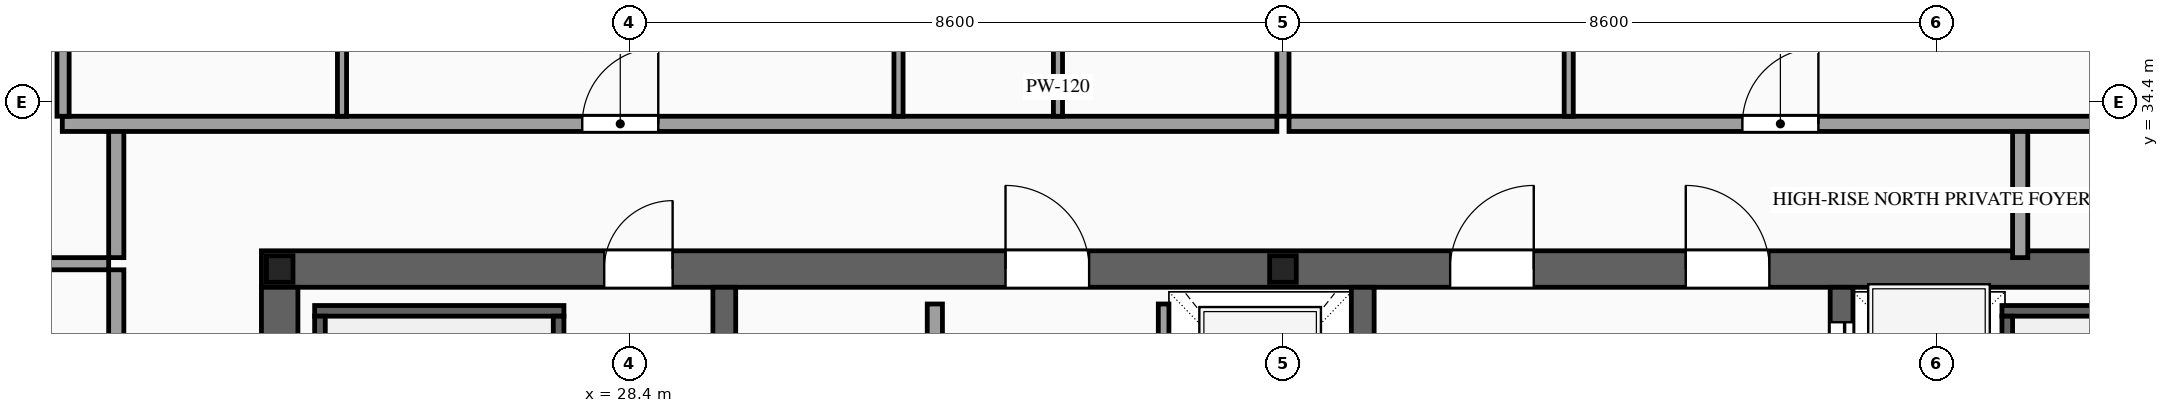
"""IFC4 building model, lengths in metres.
Left out: names, types, materials, properties, quantities, classifications, styles, units other than length and angle.
Written with IfcOpenShell. Run it as: python <this file> out.ifc"""

import sys

from ifc_helpers import new_model, si_unit, direction, frame, frame_2d, origin, origin_2d, place, context, subcontext, project, spatial, rectangle, i_section, extrude, source, transform, mapped, element, fill, save


model = new_model("IFC4")
c1 = context("Model", 3, precision=1e-05, world=origin(), true_north=direction((0.0, 1.0)))
c2 = subcontext(c1, "Body", "Model", "MODEL_VIEW")
j1 = project(units=[si_unit("LENGTHUNIT", "METRE"), si_unit("PLANEANGLEUNIT", "RADIAN")], contexts=[c1])
p1 = place(None, origin())
s1 = spatial("IfcSite", under=j1, at=p1, CompositionType="ELEMENT")
p2 = place(p1, origin())
s2 = spatial("IfcBuilding", under=s1, at=p2, CompositionType="ELEMENT")
p3 = place(p2, frame((0.0, 0.0, 318.2)))
s3 = spatial("IfcBuildingStorey", under=s2, at=p3, CompositionType="ELEMENT", Elevation=318.2)
p4 = place(p3, frame((23.56, 32.2, 0.0), z_axis=(0.0, 0.0, 1.0), x_axis=(1.0, 0.0, 0.0)))
e1 = element("IfcWall", 1, at=p4, inside=s3, PredefinedType="SHEAR", context=c2, shape_type="SweptSolid", body=[
    extrude(rectangle(XDim=26.88, YDim=0.48, at=frame_2d((13.44, 0.0))), origin(), (0.0, 0.0, 1.0), 3.5),
])
p5 = place(p4, frame((4.51, 0.0, 0.0)))
e2 = element("IfcOpeningElement", 2, at=p5, cuts=e1, PredefinedType="OPENING", context=c2, shape_type="SweptSolid", body=[
    extrude(rectangle(XDim=0.9, YDim=2.15, at=frame_2d((0.45, 1.075))), frame((0.0, 0.255, 0.0), z_axis=(0.0, -1.0, 0.0), x_axis=(1.0, 0.0, 0.0)), (0.0, 0.0, 1.0), 0.51),
])
p6 = place(p4, frame((9.79, 0.0, 0.0)))
e3 = element("IfcOpeningElement", 3, at=p6, cuts=e1, PredefinedType="OPENING", context=c2, shape_type="SweptSolid", body=[
    extrude(rectangle(XDim=1.1, YDim=2.2, at=frame_2d((0.55, 1.1))), frame((0.0, 0.255, 0.0), z_axis=(0.0, -1.0, 0.0), x_axis=(1.0, 0.0, 0.0)), (0.0, 0.0, 1.0), 0.51),
])
p7 = place(p4, frame((15.64, 0.0, 0.0)))
e4 = element("IfcOpeningElement", 4, at=p7, cuts=e1, PredefinedType="OPENING", context=c2, shape_type="SweptSolid", body=[
    extrude(rectangle(XDim=1.1, YDim=2.2, at=frame_2d((0.55, 1.1))), frame((0.0, 0.255, 0.0), z_axis=(0.0, -1.0, 0.0), x_axis=(1.0, 0.0, 0.0)), (0.0, 0.0, 1.0), 0.51),
])
p8 = place(p4, frame((18.74, 0.0, 0.0)))
e5 = element("IfcOpeningElement", 5, at=p8, cuts=e1, PredefinedType="OPENING", context=c2, shape_type="SweptSolid", body=[
    extrude(rectangle(XDim=1.1, YDim=2.2, at=frame_2d((0.55, 1.1))), frame((0.0, 0.255, 0.0), z_axis=(0.0, -1.0, 0.0), x_axis=(1.0, 0.0, 0.0)), (0.0, 0.0, 1.0), 0.51),
])
m1 = source(origin(), c2, "Body", "SweptSolid", [
    extrude(rectangle(XDim=12.32, YDim=0.48, at=frame_2d((6.16, 0.0))), origin(), (0.0, 0.0, 1.0), 3.5),
])
p9 = place(p3, frame((23.8, 19.64, 0.0), z_axis=(0.0, 0.0, 1.0), x_axis=(0.0, 1.0, 0.0)))
e6 = element("IfcWall", 6, at=p9, inside=s3, PredefinedType="SHEAR", context=c2, shape_type="MappedRepresentation", body=[
    mapped(m1, transform((0.0, 0.0, 0.0), scale=1.0)),
])
m2 = source(origin(), c2, "Body", "SweptSolid", [
    extrude(rectangle(XDim=12.32, YDim=0.3, at=frame_2d((6.16, 0.0))), origin(), (0.0, 0.0, 1.0), 3.5),
])
for number, where, z_axis, x_axis in (
    (7, (29.65, 19.64, 0.0), (0.0, 0.0, 1.0), (0.0, 1.0, 0.0)),
    (8, (38.05, 19.64, 0.0), (0.0, 0.0, 1.0), (0.0, 1.0, 0.0)),
):
    element("IfcWall", number, at=place(p3, frame(where, z_axis=z_axis, x_axis=x_axis)), inside=s3, PredefinedType="SOLIDWALL", context=c2, shape_type="MappedRepresentation", body=[
        mapped(m2, transform((0.0, 0.0, 0.0), scale=1.0)),
    ])
p10 = place(p3, frame((44.35, 19.64, 0.0), z_axis=(0.0, 0.0, 1.0), x_axis=(0.0, 1.0, 0.0)))
e9 = element("IfcWall", 9, at=p10, inside=s3, PredefinedType="SOLIDWALL", context=c2, shape_type="SweptSolid", body=[
    extrude(rectangle(XDim=12.32, YDim=0.3, at=frame_2d((6.16, 0.0))), origin(), (0.0, 0.0, 1.0), 3.5),
])
p11 = place(p10, frame((6.56, 0.0, 0.0)))
e10 = element("IfcOpeningElement", 10, at=p11, cuts=e9, PredefinedType="OPENING", context=c2, shape_type="SweptSolid", body=[
    extrude(rectangle(XDim=1.1, YDim=2.2, at=frame_2d((0.55, 1.1))), frame((0.0, 0.165, 0.0), z_axis=(0.0, -1.0, 0.0), x_axis=(1.0, 0.0, 0.0)), (0.0, 0.0, 1.0), 0.33),
])
p12 = place(p10, frame((8.66, 0.0, 0.0)))
e11 = element("IfcOpeningElement", 11, at=p12, cuts=e9, PredefinedType="OPENING", context=c2, shape_type="SweptSolid", body=[
    extrude(rectangle(XDim=1.1, YDim=2.2, at=frame_2d((0.55, 1.1))), frame((0.0, 0.165, 0.0), z_axis=(0.0, -1.0, 0.0), x_axis=(1.0, 0.0, 0.0)), (0.0, 0.0, 1.0), 0.33),
])
p13 = place(p10, frame((10.76, 0.0, 0.0)))
e12 = element("IfcOpeningElement", 12, at=p13, cuts=e9, PredefinedType="OPENING", context=c2, shape_type="SweptSolid", body=[
    extrude(rectangle(XDim=1.1, YDim=2.2, at=frame_2d((0.55, 1.1))), frame((0.0, 0.165, 0.0), z_axis=(0.0, -1.0, 0.0), x_axis=(1.0, 0.0, 0.0)), (0.0, 0.0, 1.0), 0.33),
])
m3 = source(origin(), c2, "Body", "SweptSolid", [
    extrude(i_section(OverallWidth=0.35, OverallDepth=0.35, WebThickness=0.012, FlangeThickness=0.019, at=origin_2d()), origin(), (0.0, 0.0, 1.0), 3.5),
])
for number, where, z_axis, x_axis in (
    (13, (23.8, 32.2, 0.0), (0.0, 0.0, 1.0), (1.0, 0.0, 0.0)),
    (14, (37.0, 32.2, 0.0), (0.0, 0.0, 1.0), (1.0, 0.0, 0.0)),
):
    element("IfcColumn", number, at=place(p3, frame(where, z_axis=z_axis, x_axis=x_axis)), inside=s3, PredefinedType="COLUMN", context=c2, shape_type="MappedRepresentation", body=[
        mapped(m3, transform((0.0, 0.0, 0.0), scale=1.0)),
    ])
p14 = place(p3, frame((35.43, 29.4, 0.0), z_axis=(0.0, 0.0, 1.0), x_axis=(0.0, 1.0, 0.0)))
e15 = element("IfcWall", 15, at=p14, inside=s3, PredefinedType="SOLIDWALL", context=c2, shape_type="SweptSolid", body=[
    extrude(rectangle(XDim=2.34, YDim=0.14, at=frame_2d((1.17, 0.0))), origin(), (0.0, 0.0, 1.0), 3.28),
])
p15 = place(p14, frame((0.62, 0.0, 0.0)))
e16 = element("IfcOpeningElement", 16, at=p15, cuts=e15, PredefinedType="OPENING", context=c2, shape_type="SweptSolid", body=[
    extrude(rectangle(XDim=1.1, YDim=2.2, at=frame_2d((0.55, 1.1))), frame((0.0, 0.085, 0.0), z_axis=(0.0, -1.0, 0.0), x_axis=(1.0, 0.0, 0.0)), (0.0, 0.0, 1.0), 0.17),
])
m4 = source(origin(), c2, "Body", "SweptSolid", [
    extrude(rectangle(XDim=3.28, YDim=0.14, at=frame_2d((1.64, 0.0))), origin(), (0.0, 0.0, 1.0), 3.28),
])
p16 = place(p3, frame((24.26, 31.65, 0.0), z_axis=(0.0, 0.0, 1.0), x_axis=(1.0, 0.0, 0.0)))
e17 = element("IfcWall", 17, at=p16, inside=s3, PredefinedType="SOLIDWALL", context=c2, shape_type="MappedRepresentation", body=[
    mapped(m4, transform((0.0, 0.0, 0.0), scale=1.0)),
])
m5 = source(origin(), c2, "Body", "SweptSolid", [
    extrude(rectangle(XDim=8.94, YDim=0.14, at=frame_2d((4.47, 0.0))), origin(), (0.0, 0.0, 1.0), 3.28),
])
for number, where, z_axis, x_axis in (
    (18, (24.33, 22.64, 0.0), (0.0, 0.0, 1.0), (0.0, 1.0, 0.0)),
    (19, (27.47, 22.64, 0.0), (0.0, 0.0, 1.0), (0.0, 1.0, 0.0)),
):
    element("IfcWall", number, at=place(p3, frame(where, z_axis=z_axis, x_axis=x_axis)), inside=s3, PredefinedType="SOLIDWALL", context=c2, shape_type="MappedRepresentation", body=[
        mapped(m5, transform((0.0, 0.0, 0.0), scale=1.0)),
    ])
p17 = place(p3, frame((46.46, 31.65, 0.0), z_axis=(0.0, 0.0, 1.0), x_axis=(1.0, 0.0, 0.0)))
e20 = element("IfcWall", 20, at=p17, inside=s3, PredefinedType="SOLIDWALL", context=c2, shape_type="MappedRepresentation", body=[
    mapped(m4, transform((0.0, 0.0, 0.0), scale=1.0)),
])
p18 = place(p3, frame((46.53, 22.64, 0.0), z_axis=(0.0, 0.0, 1.0), x_axis=(0.0, 1.0, 0.0)))
e21 = element("IfcWall", 21, at=p18, inside=s3, PredefinedType="SOLIDWALL", context=c2, shape_type="MappedRepresentation", body=[
    mapped(m5, transform((0.0, 0.0, 0.0), scale=1.0)),
])
p19 = place(p3, frame((32.42, 28.05, 0.0), z_axis=(0.0, 0.0, 1.0), x_axis=(0.0, 1.0, 0.0)))
e22 = element("IfcWall", 22, at=p19, inside=s3, PredefinedType="PARTITIONING", context=c2, shape_type="SweptSolid", body=[
    extrude(rectangle(XDim=3.69, YDim=0.2, at=frame_2d((1.845, 0.0))), origin(), (0.0, 0.0, 1.0), 3.28),
])
p20 = place(p19, frame((1.395, 0.0, 0.0)))
e23 = element("IfcOpeningElement", 23, at=p20, cuts=e22, PredefinedType="OPENING", context=c2, shape_type="SweptSolid", body=[
    extrude(rectangle(XDim=0.9, YDim=2.15, at=frame_2d((0.45, 1.075))), frame((0.0, 0.115, 0.0), z_axis=(0.0, -1.0, 0.0), x_axis=(1.0, 0.0, 0.0)), (0.0, 0.0, 1.0), 0.23),
])
m6 = source(origin(), c2, "Body", "SweptSolid", [
    extrude(rectangle(XDim=1.7, YDim=0.2, at=frame_2d((0.85, 0.0))), origin(), (0.0, 0.0, 1.0), 3.28),
])
for number, where, z_axis, x_axis in (
    (24, (21.65, 32.35, 0.0), (0.0, 0.0, 1.0), (0.0, 1.0, 0.0)),
    (25, (46.7, 32.35, 0.0), (0.0, 0.0, 1.0), (0.0, 1.0, 0.0)),
):
    element("IfcWall", number, at=place(p3, frame(where, z_axis=z_axis, x_axis=x_axis)), inside=s3, PredefinedType="PARTITIONING", context=c2, shape_type="MappedRepresentation", body=[
        mapped(m6, transform((0.0, 0.0, 0.0), scale=1.0)),
    ])
p21 = place(p3, frame((20.94, 34.11, 0.0), z_axis=(0.0, 0.0, 1.0), x_axis=(1.0, 0.0, 0.0)))
e26 = element("IfcWall", 26, at=p21, inside=s3, PredefinedType="PARTITIONING", context=c2, shape_type="SweptSolid", body=[
    extrude(rectangle(XDim=15.98, YDim=0.2, at=frame_2d((7.99, 0.0))), origin(), (0.0, 0.0, 1.0), 3.28),
])
p22 = place(p21, frame((6.841, 0.0, 0.0)))
e27 = element("IfcOpeningElement", 27, at=p22, cuts=e26, PredefinedType="OPENING", context=c2, shape_type="SweptSolid", body=[
    extrude(rectangle(XDim=1.0, YDim=2.2, at=frame_2d((0.5, 1.1))), frame((0.0, 0.115, 0.0), z_axis=(0.0, -1.0, 0.0), x_axis=(1.0, 0.0, 0.0)), (0.0, 0.0, 1.0), 0.23),
])
m7 = source(origin(), c2, "Body", "SweptSolid", [
    extrude(rectangle(XDim=10.54, YDim=0.16, at=frame_2d((5.27, 0.0))), origin(), (0.0, 0.0, 1.0), 2.787),
])
p23 = place(p3, frame((37.0, 34.21, 0.0), z_axis=(0.0, 0.0, 1.0), x_axis=(0.0, 1.0, 0.0)))
e28 = element("IfcWall", 28, at=p23, inside=s3, PredefinedType="PARTITIONING", context=c2, shape_type="MappedRepresentation", body=[
    mapped(m7, transform((0.0, 0.0, 0.0), scale=1.0)),
])
m8 = source(origin(), c2, "Body", "SweptSolid", [
    extrude(rectangle(XDim=2.9, YDim=0.12, at=frame_2d((1.45, 0.0))), origin(), (0.0, 0.0, 1.0), 3.28),
])
p24 = place(p3, frame((24.62, 34.21, 0.0), z_axis=(0.0, 0.0, 1.0), x_axis=(0.0, 1.0, 0.0)))
e29 = element("IfcWall", 29, at=p24, inside=s3, PredefinedType="PARTITIONING", context=c2, shape_type="MappedRepresentation", body=[
    mapped(m8, transform((0.0, 0.0, 0.0), scale=1.0)),
])
p25 = place(p3, frame((34.04, 34.21, 0.0), z_axis=(0.0, 0.0, 1.0), x_axis=(0.0, 1.0, 0.0)))
e30 = element("IfcWall", 30, at=p25, inside=s3, PredefinedType="PARTITIONING", context=c2, shape_type="SweptSolid", body=[
    extrude(rectangle(XDim=2.9, YDim=0.12, at=frame_2d((1.45, 0.0))), origin(), (0.0, 0.0, 1.0), 3.28),
])
p26 = place(p25, frame((1.025, 0.0, 0.0)))
e31 = element("IfcOpeningElement", 31, at=p26, cuts=e30, PredefinedType="OPENING", context=c2, shape_type="SweptSolid", body=[
    extrude(rectangle(XDim=0.85, YDim=2.1, at=frame_2d((0.425, 1.05))), frame((0.0, 0.075, 0.0), z_axis=(0.0, -1.0, 0.0), x_axis=(1.0, 0.0, 0.0)), (0.0, 0.0, 1.0), 0.15),
])
p27 = place(p3, frame((31.942, 34.21, 0.0), z_axis=(0.0, 0.0, 1.0), x_axis=(0.0, 1.0, 0.0)))
e32 = element("IfcWall", 32, at=p27, inside=s3, PredefinedType="PARTITIONING", context=c2, shape_type="SweptSolid", body=[
    extrude(rectangle(XDim=2.9, YDim=0.12, at=frame_2d((1.45, 0.0))), origin(), (0.0, 0.0, 1.0), 3.28),
])
p28 = place(p27, frame((1.025, 0.0, 0.0)))
e33 = element("IfcOpeningElement", 33, at=p28, cuts=e32, PredefinedType="OPENING", context=c2, shape_type="SweptSolid", body=[
    extrude(rectangle(XDim=0.85, YDim=2.1, at=frame_2d((0.425, 1.05))), frame((0.0, 0.075, 0.0), z_axis=(0.0, -1.0, 0.0), x_axis=(1.0, 0.0, 0.0)), (0.0, 0.0, 1.0), 0.15),
])
p29 = place(p3, frame((37.08, 34.11, 0.0), z_axis=(0.0, 0.0, 1.0), x_axis=(1.0, 0.0, 0.0)))
e34 = element("IfcWall", 34, at=p29, inside=s3, PredefinedType="PARTITIONING", context=c2, shape_type="SweptSolid", body=[
    extrude(rectangle(XDim=15.98, YDim=0.2, at=frame_2d((7.99, 0.0))), origin(), (0.0, 0.0, 1.0), 3.28),
])
p30 = place(p29, frame((5.965, 0.0, 0.0)))
e35 = element("IfcOpeningElement", 35, at=p30, cuts=e34, PredefinedType="OPENING", context=c2, shape_type="SweptSolid", body=[
    extrude(rectangle(XDim=1.0, YDim=2.2, at=frame_2d((0.5, 1.1))), frame((0.0, 0.115, 0.0), z_axis=(0.0, -1.0, 0.0), x_axis=(1.0, 0.0, 0.0)), (0.0, 0.0, 1.0), 0.23),
])
m9 = source(origin(), c2, "Body", "SweptSolid", [
    extrude(rectangle(XDim=10.39, YDim=0.16, at=frame_2d((5.195, 0.0))), origin(), (0.0, 0.0, 1.0), 3.28),
])
p31 = place(p3, frame((20.95, 34.21, 0.0), z_axis=(0.0, 0.0, 1.0), x_axis=(0.0, 1.0, 0.0)))
e36 = element("IfcWall", 36, at=p31, inside=s3, PredefinedType="PARTITIONING", context=c2, shape_type="MappedRepresentation", body=[
    mapped(m9, transform((0.0, 0.0, 0.0), scale=1.0)),
])
p32 = place(p3, frame((40.76, 34.21, 0.0), z_axis=(0.0, 0.0, 1.0), x_axis=(0.0, 1.0, 0.0)))
e37 = element("IfcWall", 37, at=p32, inside=s3, PredefinedType="PARTITIONING", context=c2, shape_type="MappedRepresentation", body=[
    mapped(m8, transform((0.0, 0.0, 0.0), scale=1.0)),
])
p33 = place(p3, frame((21.65, 19.41, 0.0), z_axis=(0.0, 0.0, 1.0), x_axis=(0.0, 1.0, 0.0)))
e38 = element("IfcWall", 38, at=p33, inside=s3, PredefinedType="PARTITIONING", context=c2, shape_type="SweptSolid", body=[
    extrude(rectangle(XDim=12.78, YDim=0.2, at=frame_2d((6.39, 0.0))), origin(), (0.0, 0.0, 1.0), 3.28),
])
p34 = place(p33, frame((5.89, 0.0, 0.0)))
e39 = element("IfcOpeningElement", 39, at=p34, cuts=e38, PredefinedType="OPENING", context=c2, shape_type="SweptSolid", body=[
    extrude(rectangle(XDim=1.0, YDim=2.2, at=frame_2d((0.5, 1.1))), frame((0.0, 0.115, 0.0), z_axis=(0.0, -1.0, 0.0), x_axis=(1.0, 0.0, 0.0)), (0.0, 0.0, 1.0), 0.23),
])
m10 = source(origin(), c2, "Body", "SweptSolid", [
    extrude(rectangle(XDim=3.5, YDim=0.16, at=frame_2d((1.75, 0.0))), origin(), (0.0, 0.0, 1.0), 2.825),
])
p35 = place(p3, frame((18.05, 32.27, 0.0), z_axis=(0.0, 0.0, 1.0), x_axis=(1.0, 0.0, 0.0)))
e40 = element("IfcWall", 40, at=p35, inside=s3, PredefinedType="PARTITIONING", context=c2, shape_type="MappedRepresentation", body=[
    mapped(m10, transform((0.0, 0.0, 0.0), scale=1.0)),
])
m11 = source(origin(), c2, "Body", "SweptSolid", [
    extrude(rectangle(XDim=1.1, YDim=2.2, at=frame_2d((0.55, 1.1))), frame((0.0, 0.025, 0.0), z_axis=(0.0, -1.0, 0.0), x_axis=(1.0, 0.0, 0.0)), (0.0, 0.0, 1.0), 0.05),
])
p36 = place(p13, origin())
e41 = element("IfcDoor", 41, at=p36, inside=s3, OperationType="SLIDING_TO_LEFT", PredefinedType="DOOR", context=c2, shape_type="MappedRepresentation", body=[
    mapped(m11, transform((0.0, 0.0, 0.0), scale=1.0)),
])
fill(e12, e41)
m12 = source(origin(), c2, "Body", "SweptSolid", [
    extrude(rectangle(XDim=0.9, YDim=2.15, at=frame_2d((0.45, 1.075))), frame((0.0, 0.025, 0.0), z_axis=(0.0, -1.0, 0.0), x_axis=(1.0, 0.0, 0.0)), (0.0, 0.0, 1.0), 0.05),
])
p37 = place(p5, origin())
e42 = element("IfcDoor", 42, at=p37, inside=s3, OperationType="SINGLE_SWING_RIGHT", PredefinedType="DOOR", context=c2, shape_type="MappedRepresentation", body=[
    mapped(m12, transform((0.0, 0.0, 0.0), scale=1.0)),
])
fill(e2, e42)
m13 = source(origin(), c2, "Body", "SweptSolid", [
    extrude(rectangle(XDim=1.1, YDim=2.2, at=frame_2d((0.55, 1.1))), frame((0.0, 0.025, 0.0), z_axis=(0.0, -1.0, 0.0), x_axis=(1.0, 0.0, 0.0)), (0.0, 0.0, 1.0), 0.05),
])
p38 = place(p6, origin())
e43 = element("IfcDoor", 43, at=p38, inside=s3, OperationType="SINGLE_SWING_LEFT", PredefinedType="DOOR", context=c2, shape_type="MappedRepresentation", body=[
    mapped(m13, transform((0.0, 0.0, 0.0), scale=1.0)),
])
fill(e3, e43)
p39 = place(p7, origin())
e44 = element("IfcDoor", 44, at=p39, inside=s3, OperationType="SINGLE_SWING_RIGHT", PredefinedType="DOOR", context=c2, shape_type="MappedRepresentation", body=[
    mapped(m13, transform((0.0, 0.0, 0.0), scale=1.0)),
])
fill(e4, e44)
p40 = place(p8, origin())
e45 = element("IfcDoor", 45, at=p40, inside=s3, OperationType="SINGLE_SWING_LEFT", PredefinedType="DOOR", context=c2, shape_type="MappedRepresentation", body=[
    mapped(m13, transform((0.0, 0.0, 0.0), scale=1.0)),
])
fill(e5, e45)
m14 = source(origin(), c2, "Body", "SweptSolid", [
    extrude(rectangle(XDim=1.0, YDim=2.2, at=frame_2d((0.5, 1.1))), frame((0.0, 0.025, 0.0), z_axis=(0.0, -1.0, 0.0), x_axis=(1.0, 0.0, 0.0)), (0.0, 0.0, 1.0), 0.05),
])
p41 = place(p22, origin())
e46 = element("IfcDoor", 46, at=p41, inside=s3, OperationType="SINGLE_SWING_RIGHT", PredefinedType="DOOR", context=c2, shape_type="MappedRepresentation", body=[
    mapped(m14, transform((0.0, 0.0, 0.0), scale=1.0)),
])
fill(e27, e46)
p42 = place(p30, origin())
e47 = element("IfcDoor", 47, at=p42, inside=s3, OperationType="SINGLE_SWING_RIGHT", PredefinedType="DOOR", context=c2, shape_type="MappedRepresentation", body=[
    mapped(m14, transform((0.0, 0.0, 0.0), scale=1.0)),
])
fill(e35, e47)
save(model, sys.argv[1])
